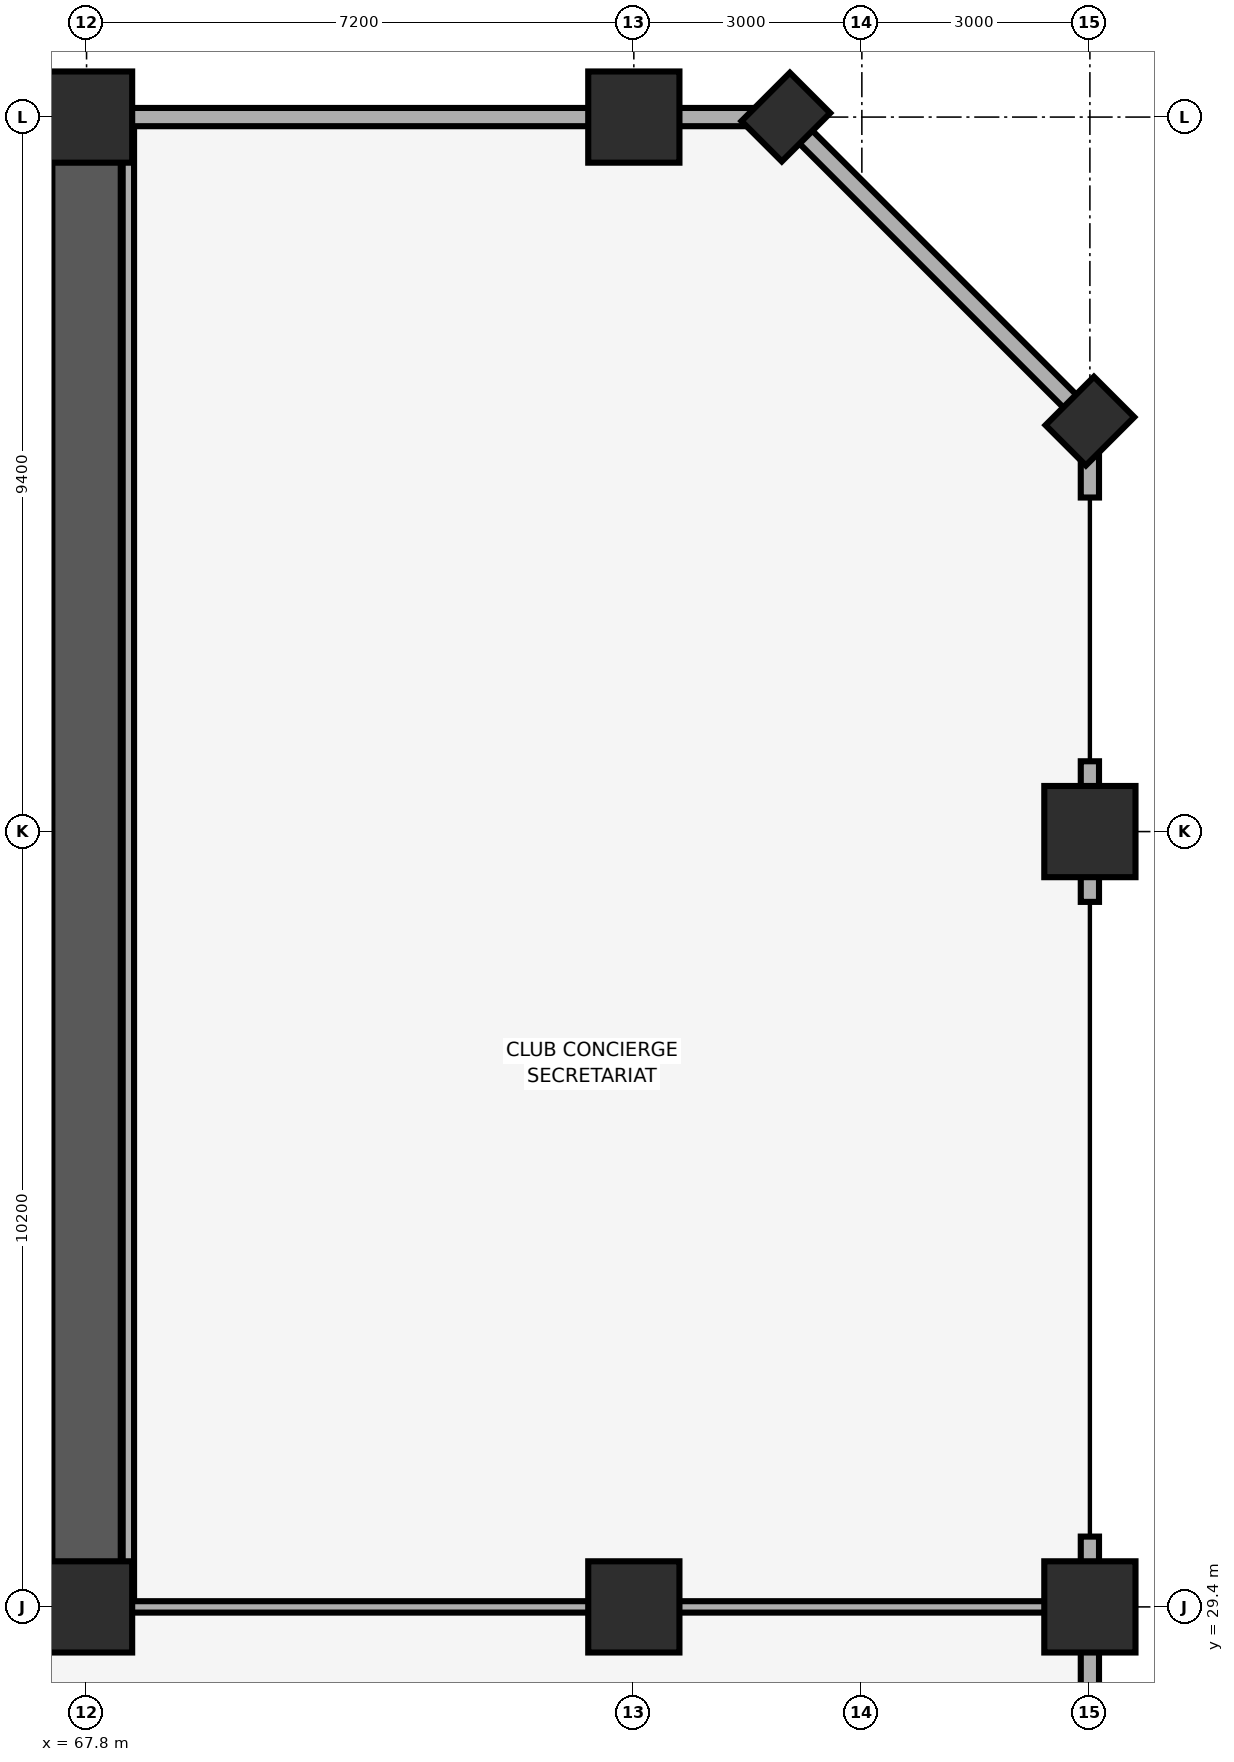
"""IFC4 building model, lengths in metres.
Left out: names, types, materials, properties, quantities, classifications, styles, units other than length and angle.
Written with IfcOpenShell. Run it as: python <this file> out.ifc"""

import sys

from ifc_helpers import new_model, si_unit, direction, frame, frame_2d, origin, origin_2d, place, context, subcontext, project, spatial, rectangle, extrude, element, fill, save


model = new_model("IFC4")
c1 = context("Model", 3, precision=1e-05, world=origin(), true_north=direction((0.0, 1.0)))
c2 = subcontext(c1, "Body", "Model", "MODEL_VIEW")
j1 = project(units=[si_unit("LENGTHUNIT", "METRE"), si_unit("PLANEANGLEUNIT", "RADIAN")], contexts=[c1])
p1 = place(None, origin())
s1 = spatial("IfcSite", under=j1, at=p1, CompositionType="ELEMENT")
p2 = place(p1, origin())
s2 = spatial("IfcBuilding", under=s1, at=p2, CompositionType="ELEMENT")
p3 = place(p2, frame((0.0, 0.0, 224.35)))
s3 = spatial("IfcBuildingStorey", under=s2, at=p3, CompositionType="ELEMENT", Elevation=224.35)
for number, where, z_axis, x_axis in (
    (1, (81.0, 29.4, 0.0), (0.0, 0.0, 1.0), (1.0, 0.0, 0.0)),
    (2, (81.0, 39.6, 0.0), (0.0, 0.0, 1.0), (1.0, 0.0, 0.0)),
):
    element("IfcColumn", number, at=place(p3, frame(where, z_axis=z_axis, x_axis=x_axis)), inside=s3, PredefinedType="COLUMN", context=c2, shape_type="SweptSolid", body=[
        extrude(rectangle(XDim=1.2, YDim=1.2, at=origin_2d()), origin(), (0.0, 0.0, 1.0), 4.56),
    ])
for number, where, z_axis, x_axis in (
    (3, (81.0, 45.0, 0.0), (0.0, 0.0, 1.0), (0.707, 0.707, 0.0)),
    (4, (77.0, 49.0, 0.0), (0.0, 0.0, 1.0), (0.707, 0.707, 0.0)),
):
    element("IfcColumn", number, at=place(p3, frame(where, z_axis=z_axis, x_axis=x_axis)), inside=s3, PredefinedType="PILASTER", context=c2, shape_type="SweptSolid", body=[
        extrude(rectangle(XDim=0.9, YDim=0.75, at=origin_2d()), origin(), (0.0, 0.0, 1.0), 4.56),
    ])
for number, where, z_axis, x_axis in (
    (5, (67.8, 29.4, 0.0), (0.0, 0.0, 1.0), (1.0, 0.0, 0.0)),
    (6, (67.8, 49.0, 0.0), (0.0, 0.0, 1.0), (1.0, 0.0, 0.0)),
    (7, (75.0, 29.4, 0.0), (0.0, 0.0, 1.0), (1.0, 0.0, 0.0)),
    (8, (75.0, 49.0, 0.0), (0.0, 0.0, 1.0), (1.0, 0.0, 0.0)),
):
    element("IfcColumn", number, at=place(p3, frame(where, z_axis=z_axis, x_axis=x_axis)), inside=s3, PredefinedType="COLUMN", context=c2, shape_type="SweptSolid", body=[
        extrude(rectangle(XDim=1.2, YDim=1.2, at=origin_2d()), origin(), (0.0, 0.0, 1.0), 4.56),
    ])
p4 = place(p3, frame((81.0, 26.475, 0.0), z_axis=(0.0, 0.0, 1.0), x_axis=(0.0, 1.0, 0.0)))
e9 = element("IfcWall", 9, at=p4, inside=s3, PredefinedType="SOLIDWALL", context=c2, shape_type="SweptSolid", body=[
    extrude(rectangle(XDim=3.85, YDim=0.24, at=frame_2d((1.925, 0.0))), origin(), (0.0, 0.0, 1.0), 4.52),
])
p5 = place(p3, frame((81.0, 38.675, 0.0), z_axis=(0.0, 0.0, 1.0), x_axis=(0.0, 1.0, 0.0)))
e10 = element("IfcWall", 10, at=p5, inside=s3, PredefinedType="SOLIDWALL", context=c2, shape_type="SweptSolid", body=[
    extrude(rectangle(XDim=1.85, YDim=0.24, at=frame_2d((0.925, 0.0))), origin(), (0.0, 0.0, 1.0), 4.52),
])
p6 = place(p3, frame((81.0, 43.995, 0.0), z_axis=(0.0, 0.0, 1.0), x_axis=(0.0, 1.0, 0.0)))
e11 = element("IfcWall", 11, at=p6, inside=s3, PredefinedType="SOLIDWALL", context=c2, shape_type="SweptSolid", body=[
    extrude(rectangle(XDim=1.005, YDim=0.24, at=frame_2d((0.502, 0.0))), origin(), (0.0, 0.0, 1.0), 4.52),
])
p7 = place(p3, frame((81.0, 45.0, 0.0), z_axis=(0.0, 0.0, 1.0), x_axis=(-0.707106781187, 0.707106781187, 0.0)))
e12 = element("IfcWall", 12, at=p7, inside=s3, PredefinedType="SOLIDWALL", context=c2, shape_type="SweptSolid", body=[
    extrude(rectangle(XDim=5.657, YDim=0.24, at=frame_2d((2.828, 0.0))), origin(), (0.0, 0.0, 1.0), 4.52),
])
p8 = place(p7, frame((1.778, 0.0, 0.85)))
e13 = element("IfcOpeningElement", 13, at=p8, cuts=e12, PredefinedType="OPENING", context=c2, shape_type="SweptSolid", body=[
    extrude(rectangle(XDim=2.1, YDim=1.6, at=frame_2d((1.05, 0.8))), frame((0.0, 0.13, 0.0), z_axis=(0.0, -1.0, 0.0), x_axis=(1.0, 0.0, 0.0)), (0.0, 0.0, 1.0), 0.26),
])
p9 = place(p3, frame((77.0, 49.0, 0.0), z_axis=(0.0, 0.0, 1.0), x_axis=(-1.0, 0.0, 0.0)))
e14 = element("IfcWall", 14, at=p9, inside=s3, PredefinedType="SOLIDWALL", context=c2, shape_type="SweptSolid", body=[
    extrude(rectangle(XDim=70.0, YDim=0.24, at=frame_2d((35.0, 0.0))), origin(), (0.0, 0.0, 1.0), 3.4),
])
p10 = place(p9, frame((62.975, 0.0, 0.85)))
e15 = element("IfcOpeningElement", 15, at=p10, cuts=e14, PredefinedType="OPENING", context=c2, shape_type="SweptSolid", body=[
    extrude(rectangle(XDim=3.0, YDim=1.5, at=frame_2d((1.5, 0.75))), frame((0.0, 0.13, 0.0), z_axis=(0.0, -1.0, 0.0), x_axis=(1.0, 0.0, 0.0)), (0.0, 0.0, 1.0), 0.26),
])
p11 = place(p9, frame((4.025, 0.0, 0.85)))
e16 = element("IfcOpeningElement", 16, at=p11, cuts=e14, PredefinedType="OPENING", context=c2, shape_type="SweptSolid", body=[
    extrude(rectangle(XDim=3.0, YDim=1.5, at=frame_2d((1.5, 0.75))), frame((0.0, 0.13, 0.0), z_axis=(0.0, -1.0, 0.0), x_axis=(1.0, 0.0, 0.0)), (0.0, 0.0, 1.0), 0.26),
])
p12 = place(p9, frame((49.465, 0.0, 0.9)))
e17 = element("IfcOpeningElement", 17, at=p12, cuts=e14, PredefinedType="OPENING", context=c2, shape_type="SweptSolid", body=[
    extrude(rectangle(XDim=1.5, YDim=1.4, at=frame_2d((0.75, 0.7))), frame((0.0, 0.13, 0.0), z_axis=(0.0, -1.0, 0.0), x_axis=(1.0, 0.0, 0.0)), (0.0, 0.0, 1.0), 0.26),
])
p13 = place(p9, frame((41.65, 0.0, 0.9)))
e18 = element("IfcOpeningElement", 18, at=p13, cuts=e14, PredefinedType="OPENING", context=c2, shape_type="SweptSolid", body=[
    extrude(rectangle(XDim=3.6, YDim=1.5, at=frame_2d((1.8, 0.75))), frame((0.0, 0.13, 0.0), z_axis=(0.0, -1.0, 0.0), x_axis=(1.0, 0.0, 0.0)), (0.0, 0.0, 1.0), 0.26),
])
p14 = place(p9, frame((28.25, 0.0, 0.9)))
e19 = element("IfcOpeningElement", 19, at=p14, cuts=e14, PredefinedType="OPENING", context=c2, shape_type="SweptSolid", body=[
    extrude(rectangle(XDim=1.5, YDim=1.4, at=frame_2d((0.75, 0.7))), frame((0.0, 0.13, 0.0), z_axis=(0.0, -1.0, 0.0), x_axis=(1.0, 0.0, 0.0)), (0.0, 0.0, 1.0), 0.26),
])
p15 = place(p9, frame((24.6, 0.0, 0.9)))
e20 = element("IfcOpeningElement", 20, at=p15, cuts=e14, PredefinedType="OPENING", context=c2, shape_type="SweptSolid", body=[
    extrude(rectangle(XDim=2.4, YDim=1.5, at=frame_2d((1.2, 0.75))), frame((0.0, 0.13, 0.0), z_axis=(0.0, -1.0, 0.0), x_axis=(1.0, 0.0, 0.0)), (0.0, 0.0, 1.0), 0.26),
])
p16 = place(p9, frame((20.235, 0.0, 0.9)))
e21 = element("IfcOpeningElement", 21, at=p16, cuts=e14, PredefinedType="OPENING", context=c2, shape_type="SweptSolid", body=[
    extrude(rectangle(XDim=2.4, YDim=1.5, at=frame_2d((1.2, 0.75))), frame((0.0, 0.13, 0.0), z_axis=(0.0, -1.0, 0.0), x_axis=(1.0, 0.0, 0.0)), (0.0, 0.0, 1.0), 0.26),
])
p17 = place(p3, frame((67.8, 29.4, 0.0), z_axis=(0.0, 0.0, 1.0), x_axis=(0.0, 1.0, 0.0)))
e22 = element("IfcWall", 22, at=p17, inside=s3, PredefinedType="SHEAR", context=c2, shape_type="SweptSolid", body=[
    extrude(rectangle(XDim=19.2, YDim=0.9, at=frame_2d((9.6, 0.0))), origin(), (0.0, 0.0, 1.0), 4.52),
])
p18 = place(p3, frame((68.35, 29.4, 0.0), z_axis=(0.0, 0.0, 1.0), x_axis=(1.0, 0.0, 0.0)))
e23 = element("IfcWall", 23, at=p18, inside=s3, PredefinedType="PARTITIONING", context=c2, shape_type="SweptSolid", body=[
    extrude(rectangle(XDim=12.5, YDim=0.15, at=frame_2d((6.25, 0.0))), origin(), (0.0, 0.0, 1.0), 3.4),
])
p19 = place(p18, frame((2.3, 0.0, 0.0)))
e24 = element("IfcOpeningElement", 24, at=p19, cuts=e23, PredefinedType="OPENING", context=c2, shape_type="SweptSolid", body=[
    extrude(rectangle(XDim=1.5, YDim=2.25, at=frame_2d((0.75, 1.125))), frame((0.0, 0.085, 0.0), z_axis=(0.0, -1.0, 0.0), x_axis=(1.0, 0.0, 0.0)), (0.0, 0.0, 1.0), 0.17),
])
p20 = place(p3, frame((68.35, 29.48, 0.0), z_axis=(0.0, 0.0, 1.0), x_axis=(0.0, 1.0, 0.0)))
e25 = element("IfcWall", 25, at=p20, inside=s3, PredefinedType="PARTITIONING", context=c2, shape_type="SweptSolid", body=[
    extrude(rectangle(XDim=19.37, YDim=0.15, at=frame_2d((9.685, 0.0))), origin(), (0.0, 0.0, 1.0), 4.52),
])
p21 = place(p8, origin())
e26 = element("IfcWindow", 26, at=p21, inside=s3, PartitioningType="SINGLE_PANEL", PredefinedType="WINDOW", context=c2, shape_type="SweptSolid", body=[
    extrude(rectangle(XDim=2.1, YDim=1.6, at=frame_2d((1.05, 0.8))), frame((0.0, 0.03, 0.0), z_axis=(0.0, -1.0, 0.0), x_axis=(1.0, 0.0, 0.0)), (0.0, 0.0, 1.0), 0.06),
])
fill(e13, e26)
p22 = place(p11, origin())
e27 = element("IfcWindow", 27, at=p22, inside=s3, PartitioningType="SINGLE_PANEL", PredefinedType="WINDOW", context=c2, shape_type="SweptSolid", body=[
    extrude(rectangle(XDim=3.0, YDim=1.5, at=frame_2d((1.5, 0.75))), frame((0.0, 0.03, 0.0), z_axis=(0.0, -1.0, 0.0), x_axis=(1.0, 0.0, 0.0)), (0.0, 0.0, 1.0), 0.06),
])
fill(e16, e27)
p23 = place(p19, origin())
e28 = element("IfcDoor", 28, at=p23, inside=s3, OperationType="DOUBLE_DOOR_SINGLE_SWING", PredefinedType="DOOR", context=c2, shape_type="SweptSolid", body=[
    extrude(rectangle(XDim=1.5, YDim=2.25, at=frame_2d((0.75, 1.125))), frame((0.0, 0.025, 0.0), z_axis=(0.0, -1.0, 0.0), x_axis=(1.0, 0.0, 0.0)), (0.0, 0.0, 1.0), 0.05),
])
fill(e24, e28)
save(model, sys.argv[1])
